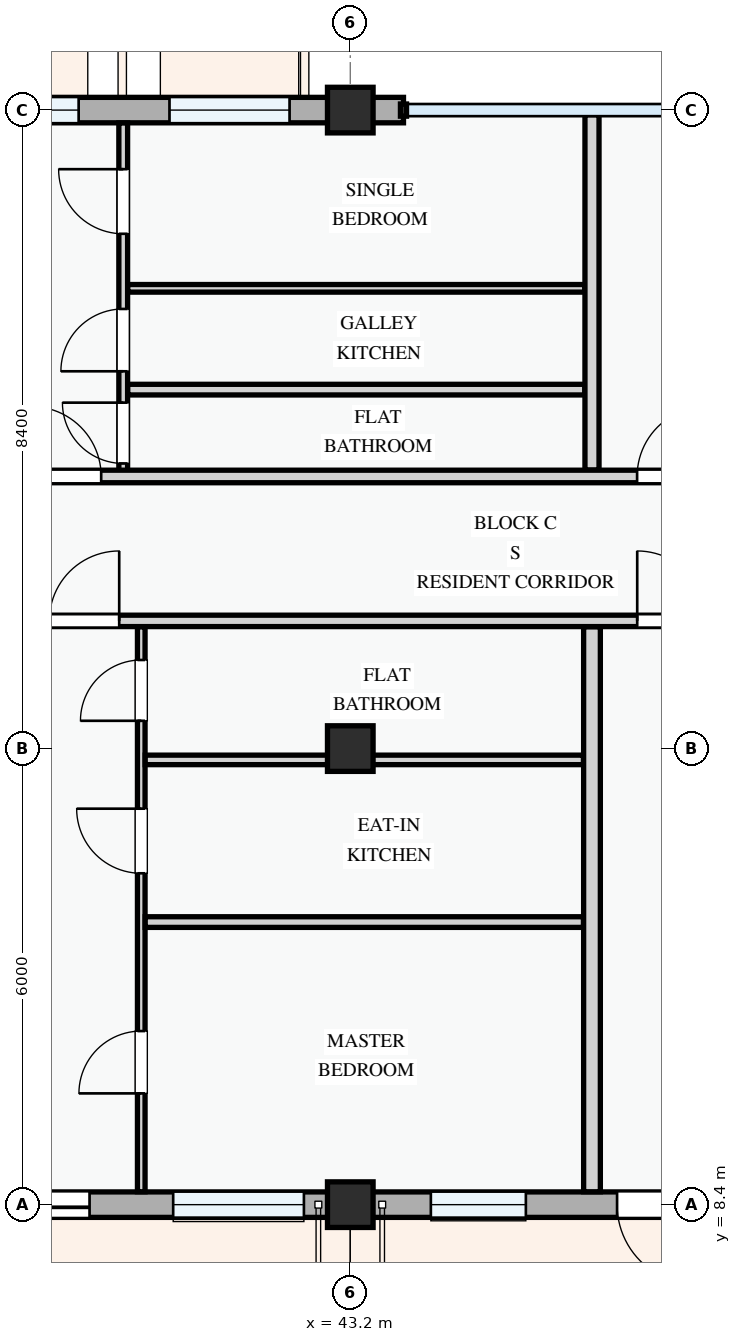
"""IFC4 building model, lengths in metres.
Left out: names, types, materials, properties, quantities, classifications, styles, units other than length and angle.
Written with IfcOpenShell. Run it as: python <this file> out.ifc"""

import sys

from ifc_helpers import new_model, si_unit, direction, frame, frame_2d, origin, origin_2d, place, context, subcontext, project, spatial, rectangle, extrude, element, fill, save


model = new_model("IFC4")
c1 = context("Model", 3, precision=1e-05, world=origin(), true_north=direction((0.0, 1.0)))
c2 = subcontext(c1, "Body", "Model", "MODEL_VIEW")
j1 = project(units=[si_unit("LENGTHUNIT", "METRE"), si_unit("PLANEANGLEUNIT", "RADIAN")], contexts=[c1])
p1 = place(None, origin())
s1 = spatial("IfcSite", under=j1, at=p1, CompositionType="ELEMENT")
p2 = place(p1, origin())
s2 = spatial("IfcBuilding", under=s1, at=p2, CompositionType="ELEMENT")
p3 = place(p2, frame((0.0, 0.0, 11.4)))
s3 = spatial("IfcBuildingStorey", under=s2, at=p3, CompositionType="ELEMENT", Elevation=11.4)
for number, where, z_axis, x_axis in (
    (1, (43.2, 8.4, 0.0), (0.0, 0.0, 1.0), (1.0, 0.0, 0.0)),
    (2, (43.2, 14.4, 0.0), (0.0, 0.0, 1.0), (1.0, 0.0, 0.0)),
    (3, (43.2, 22.8, 0.0), (0.0, 0.0, 1.0), (1.0, 0.0, 0.0)),
):
    element("IfcColumn", number, at=place(p3, frame(where, z_axis=z_axis, x_axis=x_axis)), inside=s3, PredefinedType="COLUMN", context=c2, shape_type="SweptSolid", body=[
        extrude(rectangle(XDim=0.6, YDim=0.6, at=origin_2d()), origin(), (0.0, 0.0, 1.0), 3.3),
    ])
p4 = place(p3, frame((37.2, 8.4, 0.0), z_axis=(0.0, 0.0, 1.0), x_axis=(1.0, 0.0, 0.0)))
e4 = element("IfcWall", 4, at=p4, inside=s3, PredefinedType="STANDARD", context=c2, shape_type="SweptSolid", body=[
    extrude(rectangle(XDim=6.0, YDim=0.335, at=frame_2d((3.0, 0.0))), origin(), (0.0, 0.0, 1.0), 2.475),
])
p5 = place(p4, frame((0.97, 0.0, 0.0)))
e5 = element("IfcOpeningElement", 5, at=p5, cuts=e4, PredefinedType="OPENING", context=c2, shape_type="SweptSolid", body=[
    extrude(rectangle(XDim=1.6, YDim=2.2, at=frame_2d((0.8, 1.1))), frame((0.0, 0.177, 0.0), z_axis=(0.0, -1.0, 0.0), x_axis=(1.0, 0.0, 0.0)), (0.0, 0.0, 1.0), 0.355),
])
p6 = place(p4, frame((3.67, 0.0, 0.78)))
e6 = element("IfcOpeningElement", 6, at=p6, cuts=e4, PredefinedType="OPENING", context=c2, shape_type="SweptSolid", body=[
    extrude(rectangle(XDim=1.72, YDim=1.52, at=frame_2d((0.86, 0.76))), frame((0.0, 0.177, 0.0), z_axis=(0.0, -1.0, 0.0), x_axis=(1.0, 0.0, 0.0)), (0.0, 0.0, 1.0), 0.355),
])
p7 = place(p3, frame((43.2, 8.4, 0.0), z_axis=(0.0, 0.0, 1.0), x_axis=(1.0, 0.0, 0.0)))
e7 = element("IfcWall", 7, at=p7, inside=s3, PredefinedType="STANDARD", context=c2, shape_type="SweptSolid", body=[
    extrude(rectangle(XDim=8.4, YDim=0.335, at=frame_2d((4.2, 0.0))), origin(), (0.0, 0.0, 1.0), 2.375),
])
p8 = place(p7, frame((3.51, 0.0, 0.0)))
e8 = element("IfcOpeningElement", 8, at=p8, cuts=e7, PredefinedType="OPENING", context=c2, shape_type="SweptSolid", body=[
    extrude(rectangle(XDim=1.05, YDim=2.15, at=frame_2d((0.525, 1.075))), frame((0.0, 0.177, 0.0), z_axis=(0.0, -1.0, 0.0), x_axis=(1.0, 0.0, 0.0)), (0.0, 0.0, 1.0), 0.355),
])
p9 = place(p7, frame((1.06, 0.0, 0.78)))
e9 = element("IfcOpeningElement", 9, at=p9, cuts=e7, PredefinedType="OPENING", context=c2, shape_type="SweptSolid", body=[
    extrude(rectangle(XDim=1.25, YDim=1.3, at=frame_2d((0.625, 0.65))), frame((0.0, 0.177, 0.0), z_axis=(0.0, -1.0, 0.0), x_axis=(1.0, 0.0, 0.0)), (0.0, 0.0, 1.0), 0.355),
])
p10 = place(p7, frame((5.91, 0.0, 0.78)))
e10 = element("IfcOpeningElement", 10, at=p10, cuts=e7, PredefinedType="OPENING", context=c2, shape_type="SweptSolid", body=[
    extrude(rectangle(XDim=1.0, YDim=1.25, at=frame_2d((0.5, 0.625))), frame((0.0, 0.177, 0.0), z_axis=(0.0, -1.0, 0.0), x_axis=(1.0, 0.0, 0.0)), (0.0, 0.0, 1.0), 0.355),
])
p11 = place(p3, frame((43.9, 22.8, 0.0), z_axis=(0.0, 0.0, 1.0), x_axis=(-1.0, 0.0, 0.0)))
e11 = element("IfcWall", 11, at=p11, inside=s3, PredefinedType="STANDARD", context=c2, shape_type="SweptSolid", body=[
    extrude(rectangle(XDim=0.7, YDim=0.335, at=frame_2d((0.35, 0.0))), origin(), (0.0, 0.0, 1.0), 2.375),
])
p12 = place(p3, frame((43.2, 22.8, 0.0), z_axis=(0.0, 0.0, 1.0), x_axis=(-1.0, 0.0, 0.0)))
e12 = element("IfcWall", 12, at=p12, inside=s3, PredefinedType="STANDARD", context=c2, shape_type="SweptSolid", body=[
    extrude(rectangle(XDim=6.0, YDim=0.335, at=frame_2d((3.0, 0.0))), origin(), (0.0, 0.0, 1.0), 2.475),
])
p13 = place(p12, frame((0.799, 0.0, 0.78)))
e13 = element("IfcOpeningElement", 13, at=p13, cuts=e12, PredefinedType="OPENING", context=c2, shape_type="SweptSolid", body=[
    extrude(rectangle(XDim=1.58, YDim=1.48, at=frame_2d((0.79, 0.74))), frame((0.0, 0.177, 0.0), z_axis=(0.0, -1.0, 0.0), x_axis=(1.0, 0.0, 0.0)), (0.0, 0.0, 1.0), 0.355),
])
p14 = place(p12, frame((3.573, 0.0, 0.78)))
e14 = element("IfcOpeningElement", 14, at=p14, cuts=e12, PredefinedType="OPENING", context=c2, shape_type="SweptSolid", body=[
    extrude(rectangle(XDim=1.65, YDim=1.5, at=frame_2d((0.825, 0.75))), frame((0.0, 0.177, 0.0), z_axis=(0.0, -1.0, 0.0), x_axis=(1.0, 0.0, 0.0)), (0.0, 0.0, 1.0), 0.355),
])
p15 = place(p3, frame((40.45, 8.57, 0.0), z_axis=(0.0, 0.0, 1.0), x_axis=(0.0, 1.0, 0.0)))
e15 = element("IfcWall", 15, at=p15, inside=s3, PredefinedType="PARTITIONING", context=c2, shape_type="SweptSolid", body=[
    extrude(rectangle(XDim=7.433, YDim=0.1, at=frame_2d((3.717, 0.0))), origin(), (0.0, 0.0, 1.0), 3.0),
])
p16 = place(p15, frame((1.294, 0.0, 0.0)))
e16 = element("IfcOpeningElement", 16, at=p16, cuts=e15, PredefinedType="OPENING", context=c2, shape_type="SweptSolid", body=[
    extrude(rectangle(XDim=0.82, YDim=2.08, at=frame_2d((0.41, 1.04))), frame((0.0, 0.06, 0.0), z_axis=(0.0, -1.0, 0.0), x_axis=(1.0, 0.0, 0.0)), (0.0, 0.0, 1.0), 0.12),
])
p17 = place(p15, frame((4.19, 0.0, 0.0)))
e17 = element("IfcOpeningElement", 17, at=p17, cuts=e15, PredefinedType="OPENING", context=c2, shape_type="SweptSolid", body=[
    extrude(rectangle(XDim=0.85, YDim=2.1, at=frame_2d((0.425, 1.05))), frame((0.0, 0.06, 0.0), z_axis=(0.0, -1.0, 0.0), x_axis=(1.0, 0.0, 0.0)), (0.0, 0.0, 1.0), 0.12),
])
p18 = place(p15, frame((6.196, 0.0, 0.0)))
e18 = element("IfcOpeningElement", 18, at=p18, cuts=e15, PredefinedType="OPENING", context=c2, shape_type="SweptSolid", body=[
    extrude(rectangle(XDim=0.8, YDim=2.1, at=frame_2d((0.4, 1.05))), frame((0.0, 0.06, 0.0), z_axis=(0.0, -1.0, 0.0), x_axis=(1.0, 0.0, 0.0)), (0.0, 0.0, 1.0), 0.12),
])
p19 = place(p3, frame((40.502, 12.118, 0.0), z_axis=(0.0, 0.0, 1.0), x_axis=(1.0, 0.0, 0.0)))
e19 = element("IfcWall", 19, at=p19, inside=s3, PredefinedType="PARTITIONING", context=c2, shape_type="SweptSolid", body=[
    extrude(rectangle(XDim=5.766, YDim=0.14, at=frame_2d((2.883, 0.0))), origin(), (0.0, 0.0, 1.0), 3.0),
])
p20 = place(p3, frame((40.502, 14.251, 0.0), z_axis=(0.0, 0.0, 1.0), x_axis=(1.0, 0.0, 0.0)))
e20 = element("IfcWall", 20, at=p20, inside=s3, PredefinedType="PARTITIONING", context=c2, shape_type="SweptSolid", body=[
    extrude(rectangle(XDim=5.766, YDim=0.125, at=frame_2d((2.883, 0.0))), origin(), (0.0, 0.0, 1.0), 2.375),
])
p21 = place(p3, frame((40.213, 17.98, 0.0), z_axis=(0.0, 0.0, 1.0), x_axis=(0.0, 1.0, 0.0)))
e21 = element("IfcWall", 21, at=p21, inside=s3, PredefinedType="PARTITIONING", context=c2, shape_type="SweptSolid", body=[
    extrude(rectangle(XDim=4.651, YDim=0.115, at=frame_2d((2.325, 0.0))), origin(), (0.0, 0.0, 1.0), 3.0),
])
p22 = place(p21, frame((0.171, 0.0, 0.0)))
e22 = element("IfcOpeningElement", 22, at=p22, cuts=e21, PredefinedType="OPENING", context=c2, shape_type="SweptSolid", body=[
    extrude(rectangle(XDim=0.8, YDim=2.1, at=frame_2d((0.4, 1.05))), frame((0.0, 0.067, 0.0), z_axis=(0.0, -1.0, 0.0), x_axis=(1.0, 0.0, 0.0)), (0.0, 0.0, 1.0), 0.135),
])
p23 = place(p21, frame((1.384, 0.0, 0.0)))
e23 = element("IfcOpeningElement", 23, at=p23, cuts=e21, PredefinedType="OPENING", context=c2, shape_type="SweptSolid", body=[
    extrude(rectangle(XDim=0.82, YDim=2.08, at=frame_2d((0.41, 1.04))), frame((0.0, 0.067, 0.0), z_axis=(0.0, -1.0, 0.0), x_axis=(1.0, 0.0, 0.0)), (0.0, 0.0, 1.0), 0.135),
])
p24 = place(p21, frame((3.193, 0.0, 0.0)))
e24 = element("IfcOpeningElement", 24, at=p24, cuts=e21, PredefinedType="OPENING", context=c2, shape_type="SweptSolid", body=[
    extrude(rectangle(XDim=0.85, YDim=2.1, at=frame_2d((0.425, 1.05))), frame((0.0, 0.067, 0.0), z_axis=(0.0, -1.0, 0.0), x_axis=(1.0, 0.0, 0.0)), (0.0, 0.0, 1.0), 0.135),
])
p25 = place(p3, frame((40.272, 20.455, 0.0), z_axis=(0.0, 0.0, 1.0), x_axis=(1.0, 0.0, 0.0)))
e25 = element("IfcWall", 25, at=p25, inside=s3, PredefinedType="PARTITIONING", context=c2, shape_type="SweptSolid", body=[
    extrude(rectangle(XDim=6.013, YDim=0.1, at=frame_2d((3.007, 0.0))), origin(), (0.0, 0.0, 1.0), 3.0),
])
p26 = place(p3, frame((40.272, 19.122, 0.0), z_axis=(0.0, 0.0, 1.0), x_axis=(1.0, 0.0, 0.0)))
e26 = element("IfcWall", 26, at=p26, inside=s3, PredefinedType="PARTITIONING", context=c2, shape_type="SweptSolid", body=[
    extrude(rectangle(XDim=6.013, YDim=0.14, at=frame_2d((3.007, 0.0))), origin(), (0.0, 0.0, 1.0), 3.0),
])
p27 = place(p3, frame((46.38, 8.57, 0.0), z_axis=(0.0, 0.0, 1.0), x_axis=(0.0, 1.0, 0.0)))
e27 = element("IfcWall", 27, at=p27, inside=s3, PredefinedType="PARTITIONING", context=c2, shape_type="SweptSolid", body=[
    extrude(rectangle(XDim=7.433, YDim=0.22, at=frame_2d((3.717, 0.0))), origin(), (0.0, 0.0, 1.0), 3.0),
])
p28 = place(p3, frame((46.38, 18.064, 0.0), z_axis=(0.0, 0.0, 1.0), x_axis=(0.0, 1.0, 0.0)))
e28 = element("IfcWall", 28, at=p28, inside=s3, PredefinedType="PARTITIONING", context=c2, shape_type="SweptSolid", body=[
    extrude(rectangle(XDim=4.676, YDim=0.185, at=frame_2d((2.338, 0.0))), origin(), (0.0, 0.0, 1.0), 3.0),
])
p29 = place(p3, frame((22.66, 16.08, 0.0), z_axis=(0.0, 0.0, 1.0), x_axis=(1.0, 0.0, 0.0)))
e29 = element("IfcWall", 29, at=p29, inside=s3, PredefinedType="PARTITIONING", context=c2, shape_type="SweptSolid", body=[
    extrude(rectangle(XDim=34.88, YDim=0.15, at=frame_2d((17.44, 0.0))), origin(), (0.0, 0.0, 1.0), 3.0),
])
p30 = place(p29, frame((2.672, 0.0, 0.0)))
e30 = element("IfcOpeningElement", 30, at=p30, cuts=e29, PredefinedType="OPENING", context=c2, shape_type="SweptSolid", body=[
    extrude(rectangle(XDim=0.92, YDim=2.1, at=frame_2d((0.46, 1.05))), frame((0.0, 0.085, 0.0), z_axis=(0.0, -1.0, 0.0), x_axis=(1.0, 0.0, 0.0)), (0.0, 0.0, 1.0), 0.17),
])
p31 = place(p29, frame((16.58, 0.0, 0.0)))
e31 = element("IfcOpeningElement", 31, at=p31, cuts=e29, PredefinedType="OPENING", context=c2, shape_type="SweptSolid", body=[
    extrude(rectangle(XDim=0.92, YDim=2.1, at=frame_2d((0.46, 1.05))), frame((0.0, 0.085, 0.0), z_axis=(0.0, -1.0, 0.0), x_axis=(1.0, 0.0, 0.0)), (0.0, 0.0, 1.0), 0.17),
])
p32 = place(p29, frame((24.315, 0.0, 0.0)))
e32 = element("IfcOpeningElement", 32, at=p32, cuts=e29, PredefinedType="OPENING", context=c2, shape_type="SweptSolid", body=[
    extrude(rectangle(XDim=0.92, YDim=2.1, at=frame_2d((0.46, 1.05))), frame((0.0, 0.085, 0.0), z_axis=(0.0, -1.0, 0.0), x_axis=(1.0, 0.0, 0.0)), (0.0, 0.0, 1.0), 0.17),
])
p33 = place(p3, frame((22.66, 17.98, 0.0), z_axis=(0.0, 0.0, 1.0), x_axis=(1.0, 0.0, 0.0)))
e33 = element("IfcWall", 33, at=p33, inside=s3, PredefinedType="PARTITIONING", context=c2, shape_type="SweptSolid", body=[
    extrude(rectangle(XDim=34.88, YDim=0.165, at=frame_2d((17.44, 0.0))), origin(), (0.0, 0.0, 1.0), 3.0),
])
p34 = place(p33, frame((2.633, 0.0, 0.0)))
e34 = element("IfcOpeningElement", 34, at=p34, cuts=e33, PredefinedType="OPENING", context=c2, shape_type="SweptSolid", body=[
    extrude(rectangle(XDim=0.96, YDim=2.12, at=frame_2d((0.48, 1.06))), frame((0.0, 0.093, 0.0), z_axis=(0.0, -1.0, 0.0), x_axis=(1.0, 0.0, 0.0)), (0.0, 0.0, 1.0), 0.185),
])
p35 = place(p33, frame((16.343, 0.0, 0.0)))
e35 = element("IfcOpeningElement", 35, at=p35, cuts=e33, PredefinedType="OPENING", context=c2, shape_type="SweptSolid", body=[
    extrude(rectangle(XDim=0.92, YDim=2.1, at=frame_2d((0.46, 1.05))), frame((0.0, 0.093, 0.0), z_axis=(0.0, -1.0, 0.0), x_axis=(1.0, 0.0, 0.0)), (0.0, 0.0, 1.0), 0.185),
])
p36 = place(p33, frame((24.313, 0.0, 0.0)))
e36 = element("IfcOpeningElement", 36, at=p36, cuts=e33, PredefinedType="OPENING", context=c2, shape_type="SweptSolid", body=[
    extrude(rectangle(XDim=0.92, YDim=2.1, at=frame_2d((0.46, 1.05))), frame((0.0, 0.093, 0.0), z_axis=(0.0, -1.0, 0.0), x_axis=(1.0, 0.0, 0.0)), (0.0, 0.0, 1.0), 0.185),
])
p37 = place(p5, frame((1.6, 0.0, 0.0), z_axis=(0.0, 0.0, 1.0), x_axis=(-1.0, 0.0, 0.0)))
e37 = element("IfcDoor", 37, at=p37, inside=s3, OperationType="SLIDING_TO_LEFT", PredefinedType="DOOR", context=c2, shape_type="SweptSolid", body=[
    extrude(rectangle(XDim=1.6, YDim=2.2, at=frame_2d((0.8, 1.1))), frame((0.0, 0.025, 0.0), z_axis=(0.0, -1.0, 0.0), x_axis=(1.0, 0.0, 0.0)), (0.0, 0.0, 1.0), 0.05),
])
fill(e5, e37)
p38 = place(p6, origin())
e38 = element("IfcWindow", 38, at=p38, inside=s3, PartitioningType="DOUBLE_PANEL_VERTICAL", PredefinedType="WINDOW", context=c2, shape_type="SweptSolid", body=[
    extrude(rectangle(XDim=1.72, YDim=1.52, at=frame_2d((0.86, 0.76))), frame((0.0, 0.03, 0.0), z_axis=(0.0, -1.0, 0.0), x_axis=(1.0, 0.0, 0.0)), (0.0, 0.0, 1.0), 0.06),
])
fill(e6, e38)
p39 = place(p8, frame((1.05, 0.0, 0.0), z_axis=(0.0, 0.0, 1.0), x_axis=(-1.0, 0.0, 0.0)))
e39 = element("IfcDoor", 39, at=p39, inside=s3, OperationType="SINGLE_SWING_LEFT", PredefinedType="DOOR", context=c2, shape_type="SweptSolid", body=[
    extrude(rectangle(XDim=1.05, YDim=2.15, at=frame_2d((0.525, 1.075))), frame((0.0, 0.025, 0.0), z_axis=(0.0, -1.0, 0.0), x_axis=(1.0, 0.0, 0.0)), (0.0, 0.0, 1.0), 0.05),
])
fill(e8, e39)
p40 = place(p9, origin())
e40 = element("IfcWindow", 40, at=p40, inside=s3, PartitioningType="SINGLE_PANEL", PredefinedType="WINDOW", context=c2, shape_type="SweptSolid", body=[
    extrude(rectangle(XDim=1.25, YDim=1.3, at=frame_2d((0.625, 0.65))), frame((0.0, 0.03, 0.0), z_axis=(0.0, -1.0, 0.0), x_axis=(1.0, 0.0, 0.0)), (0.0, 0.0, 1.0), 0.06),
])
fill(e9, e40)
p41 = place(p13, origin())
e41 = element("IfcWindow", 41, at=p41, inside=s3, PartitioningType="SINGLE_PANEL", PredefinedType="WINDOW", context=c2, shape_type="SweptSolid", body=[
    extrude(rectangle(XDim=1.58, YDim=1.48, at=frame_2d((0.79, 0.74))), frame((0.0, 0.03, 0.0), z_axis=(0.0, -1.0, 0.0), x_axis=(1.0, 0.0, 0.0)), (0.0, 0.0, 1.0), 0.06),
])
fill(e13, e41)
p42 = place(p14, origin())
e42 = element("IfcWindow", 42, at=p42, inside=s3, PartitioningType="DOUBLE_PANEL_VERTICAL", PredefinedType="WINDOW", context=c2, shape_type="SweptSolid", body=[
    extrude(rectangle(XDim=1.65, YDim=1.5, at=frame_2d((0.825, 0.75))), frame((0.0, 0.03, 0.0), z_axis=(0.0, -1.0, 0.0), x_axis=(1.0, 0.0, 0.0)), (0.0, 0.0, 1.0), 0.06),
])
fill(e14, e42)
p43 = place(p16, origin())
e43 = element("IfcDoor", 43, at=p43, inside=s3, OperationType="SINGLE_SWING_LEFT", PredefinedType="DOOR", context=c2, shape_type="SweptSolid", body=[
    extrude(rectangle(XDim=0.82, YDim=2.08, at=frame_2d((0.41, 1.04))), frame((0.0, 0.025, 0.0), z_axis=(0.0, -1.0, 0.0), x_axis=(1.0, 0.0, 0.0)), (0.0, 0.0, 1.0), 0.05),
])
fill(e16, e43)
p44 = place(p17, origin())
e44 = element("IfcDoor", 44, at=p44, inside=s3, OperationType="SINGLE_SWING_RIGHT", PredefinedType="DOOR", context=c2, shape_type="SweptSolid", body=[
    extrude(rectangle(XDim=0.85, YDim=2.1, at=frame_2d((0.425, 1.05))), frame((0.0, 0.025, 0.0), z_axis=(0.0, -1.0, 0.0), x_axis=(1.0, 0.0, 0.0)), (0.0, 0.0, 1.0), 0.05),
])
fill(e17, e44)
p45 = place(p18, origin())
e45 = element("IfcDoor", 45, at=p45, inside=s3, OperationType="SINGLE_SWING_LEFT", PredefinedType="DOOR", context=c2, shape_type="SweptSolid", body=[
    extrude(rectangle(XDim=0.8, YDim=2.1, at=frame_2d((0.4, 1.05))), frame((0.0, 0.025, 0.0), z_axis=(0.0, -1.0, 0.0), x_axis=(1.0, 0.0, 0.0)), (0.0, 0.0, 1.0), 0.05),
])
fill(e18, e45)
p46 = place(p22, origin())
e46 = element("IfcDoor", 46, at=p46, inside=s3, OperationType="SINGLE_SWING_RIGHT", PredefinedType="DOOR", context=c2, shape_type="SweptSolid", body=[
    extrude(rectangle(XDim=0.8, YDim=2.1, at=frame_2d((0.4, 1.05))), frame((0.0, 0.025, 0.0), z_axis=(0.0, -1.0, 0.0), x_axis=(1.0, 0.0, 0.0)), (0.0, 0.0, 1.0), 0.05),
])
fill(e22, e46)
p47 = place(p23, origin())
e47 = element("IfcDoor", 47, at=p47, inside=s3, OperationType="SINGLE_SWING_LEFT", PredefinedType="DOOR", context=c2, shape_type="SweptSolid", body=[
    extrude(rectangle(XDim=0.82, YDim=2.08, at=frame_2d((0.41, 1.04))), frame((0.0, 0.025, 0.0), z_axis=(0.0, -1.0, 0.0), x_axis=(1.0, 0.0, 0.0)), (0.0, 0.0, 1.0), 0.05),
])
fill(e23, e47)
p48 = place(p24, origin())
e48 = element("IfcDoor", 48, at=p48, inside=s3, OperationType="SINGLE_SWING_RIGHT", PredefinedType="DOOR", context=c2, shape_type="SweptSolid", body=[
    extrude(rectangle(XDim=0.85, YDim=2.1, at=frame_2d((0.425, 1.05))), frame((0.0, 0.025, 0.0), z_axis=(0.0, -1.0, 0.0), x_axis=(1.0, 0.0, 0.0)), (0.0, 0.0, 1.0), 0.05),
])
fill(e24, e48)
p49 = place(p31, origin())
e49 = element("IfcDoor", 49, at=p49, inside=s3, OperationType="SINGLE_SWING_RIGHT", PredefinedType="DOOR", context=c2, shape_type="SweptSolid", body=[
    extrude(rectangle(XDim=0.92, YDim=2.1, at=frame_2d((0.46, 1.05))), frame((0.0, 0.025, 0.0), z_axis=(0.0, -1.0, 0.0), x_axis=(1.0, 0.0, 0.0)), (0.0, 0.0, 1.0), 0.05),
])
fill(e31, e49)
p50 = place(p32, origin())
e50 = element("IfcDoor", 50, at=p50, inside=s3, OperationType="SINGLE_SWING_LEFT", PredefinedType="DOOR", context=c2, shape_type="SweptSolid", body=[
    extrude(rectangle(XDim=0.92, YDim=2.1, at=frame_2d((0.46, 1.05))), frame((0.0, 0.025, 0.0), z_axis=(0.0, -1.0, 0.0), x_axis=(1.0, 0.0, 0.0)), (0.0, 0.0, 1.0), 0.05),
])
fill(e32, e50)
p51 = place(p35, origin())
e51 = element("IfcDoor", 51, at=p51, inside=s3, OperationType="SINGLE_SWING_LEFT", PredefinedType="DOOR", context=c2, shape_type="SweptSolid", body=[
    extrude(rectangle(XDim=0.92, YDim=2.1, at=frame_2d((0.46, 1.05))), frame((0.0, 0.025, 0.0), z_axis=(0.0, -1.0, 0.0), x_axis=(1.0, 0.0, 0.0)), (0.0, 0.0, 1.0), 0.05),
])
fill(e35, e51)
p52 = place(p36, origin())
e52 = element("IfcDoor", 52, at=p52, inside=s3, OperationType="SINGLE_SWING_RIGHT", PredefinedType="DOOR", context=c2, shape_type="SweptSolid", body=[
    extrude(rectangle(XDim=0.92, YDim=2.1, at=frame_2d((0.46, 1.05))), frame((0.0, 0.025, 0.0), z_axis=(0.0, -1.0, 0.0), x_axis=(1.0, 0.0, 0.0)), (0.0, 0.0, 1.0), 0.05),
])
fill(e36, e52)
save(model, sys.argv[1])
